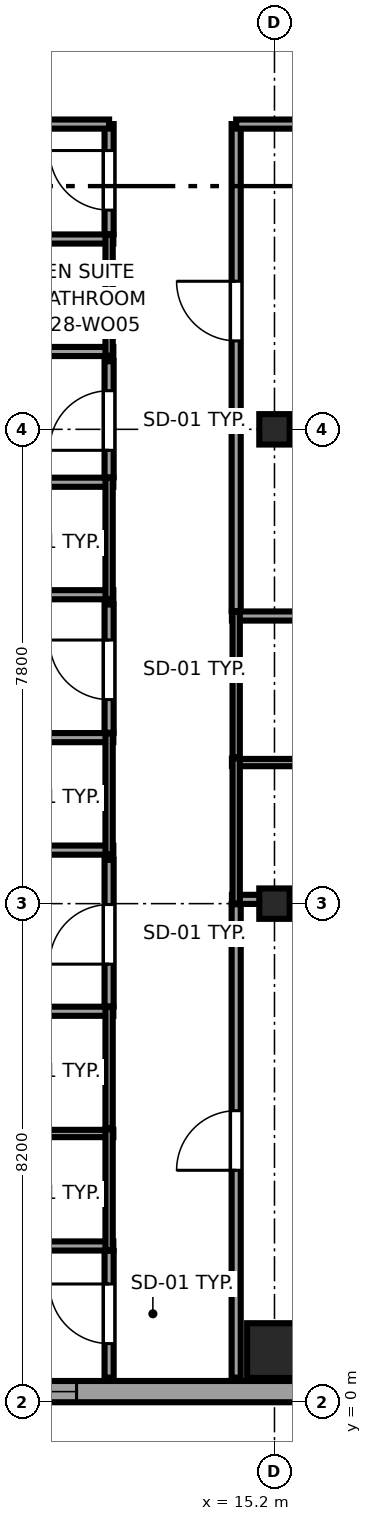
"""IFC4 building model, lengths in metres.
Left out: names, types, materials, properties, quantities, classifications, styles, units other than length and angle.
Written with IfcOpenShell. Run it as: python <this file> out.ifc"""

import sys

from ifc_helpers import new_model, si_unit, direction, frame, frame_2d, origin, origin_2d, place, context, subcontext, project, spatial, rectangle, i_section, extrude, source, transform, mapped, element, fill, save


model = new_model("IFC4")
c1 = context("Model", 3, precision=1e-05, world=origin(), true_north=direction((0.0, 1.0)))
c2 = subcontext(c1, "Body", "Model", "MODEL_VIEW")
j1 = project(units=[si_unit("LENGTHUNIT", "METRE"), si_unit("PLANEANGLEUNIT", "RADIAN")], contexts=[c1])
p1 = place(None, origin())
s1 = spatial("IfcSite", under=j1, at=p1, CompositionType="ELEMENT")
p2 = place(p1, origin())
s2 = spatial("IfcBuilding", under=s1, at=p2, CompositionType="ELEMENT")
p3 = place(p2, frame((0.0, 0.0, 111.55)))
s3 = spatial("IfcBuildingStorey", under=s2, at=p3, CompositionType="ELEMENT", Elevation=111.55)
m1 = source(origin(), c2, "Body", "SweptSolid", [
    extrude(rectangle(XDim=0.9, YDim=0.9, at=origin_2d()), origin(), (0.0, 0.0, 1.0), 3.55),
])
p4 = place(p3, frame((15.2, 0.85, 0.0), z_axis=(0.0, 0.0, 1.0), x_axis=(1.0, 0.0, 0.0)))
e1 = element("IfcColumn", 1, at=p4, inside=s3, PredefinedType="COLUMN", context=c2, shape_type="MappedRepresentation", body=[
    mapped(m1, transform((0.0, 0.0, 0.0), x_axis=(1.0, 0.0, 0.0), y_axis=(0.0, 1.0, 0.0), z_axis=(0.0, 0.0, 1.0), scale=1.0)),
])
m2 = source(origin(), c2, "Body", "SweptSolid", [
    extrude(i_section(OverallWidth=0.5, OverallDepth=0.5, WebThickness=0.022, FlangeThickness=0.034, at=origin_2d()), origin(), (0.0, 0.0, 1.0), 3.55),
])
for number, where, z_axis, x_axis in (
    (2, (15.2, 8.2, 0.0), (0.0, 0.0, 1.0), (1.0, 0.0, 0.0)),
    (3, (15.2, 16.0, 0.0), (0.0, 0.0, 1.0), (1.0, 0.0, 0.0)),
):
    element("IfcColumn", number, at=place(p3, frame(where, z_axis=z_axis, x_axis=x_axis)), inside=s3, PredefinedType="COLUMN", context=c2, shape_type="MappedRepresentation", body=[
        mapped(m2, transform((0.0, 0.0, 0.0), x_axis=(1.0, 0.0, 0.0), y_axis=(0.0, 1.0, 0.0), z_axis=(0.0, 0.0, 1.0), scale=1.0)),
    ])
p5 = place(p3, frame((4.617, 0.175, 0.0), z_axis=(0.0, 0.0, 1.0), x_axis=(1.0, 0.0, 0.0)))
e4 = element("IfcWall", 4, at=p5, inside=s3, PredefinedType="SOLIDWALL", context=c2, shape_type="SweptSolid", body=[
    extrude(rectangle(XDim=18.008, YDim=0.35, at=frame_2d((9.004, 0.0))), origin(), (0.0, 0.0, 1.0), 3.37),
])
p6 = place(p5, frame((5.378, 0.0, 0.68)))
e5 = element("IfcOpeningElement", 5, at=p6, cuts=e4, PredefinedType="OPENING", context=c2, shape_type="SweptSolid", body=[
    extrude(rectangle(XDim=1.95, YDim=1.82, at=frame_2d((0.975, 0.91))), frame((0.0, 0.185, 0.0), z_axis=(0.0, -1.0, 0.0), x_axis=(1.0, 0.0, 0.0)), (0.0, 0.0, 1.0), 0.37),
])
p7 = place(p5, frame((14.332, 0.0, 0.68)))
e6 = element("IfcOpeningElement", 6, at=p7, cuts=e4, PredefinedType="OPENING", context=c2, shape_type="SweptSolid", body=[
    extrude(rectangle(XDim=1.95, YDim=1.82, at=frame_2d((0.975, 0.91))), frame((0.0, 0.185, 0.0), z_axis=(0.0, -1.0, 0.0), x_axis=(1.0, 0.0, 0.0)), (0.0, 0.0, 1.0), 0.37),
])
p8 = place(p3, frame((9.96, 2.57, 0.0), z_axis=(0.0, 0.0, 1.0), x_axis=(1.0, 0.0, 0.0)))
e7 = element("IfcWall", 7, at=p8, inside=s3, PredefinedType="PARTITIONING", context=c2, shape_type="SweptSolid", body=[
    extrude(rectangle(XDim=2.59, YDim=0.15, at=frame_2d((1.295, 0.0))), origin(), (0.0, 0.0, 1.0), 3.37),
])
p9 = place(p3, frame((9.96, 4.42, 0.0), z_axis=(0.0, 0.0, 1.0), x_axis=(1.0, 0.0, 0.0)))
e8 = element("IfcWall", 8, at=p9, inside=s3, PredefinedType="PLUMBINGWALL", context=c2, shape_type="SweptSolid", body=[
    extrude(rectangle(XDim=2.59, YDim=0.12, at=frame_2d((1.295, 0.0))), origin(), (0.0, 0.0, 1.0), 3.37),
])
p10 = place(p3, frame((12.48, 2.5, 0.0), z_axis=(0.0, 0.0, 1.0), x_axis=(0.0, 1.0, 0.0)))
e9 = element("IfcWall", 9, at=p10, inside=s3, PredefinedType="PLUMBINGWALL", context=c2, shape_type="SweptSolid", body=[
    extrude(rectangle(XDim=1.99, YDim=0.12, at=frame_2d((0.995, 0.0))), origin(), (0.0, 0.0, 1.0), 3.37),
])
p11 = place(p3, frame((9.96, 6.43, 0.0), z_axis=(0.0, 0.0, 1.0), x_axis=(1.0, 0.0, 0.0)))
e10 = element("IfcWall", 10, at=p11, inside=s3, PredefinedType="PARTITIONING", context=c2, shape_type="SweptSolid", body=[
    extrude(rectangle(XDim=2.59, YDim=0.15, at=frame_2d((1.295, 0.0))), origin(), (0.0, 0.0, 1.0), 3.37),
])
p12 = place(p3, frame((12.48, 4.51, 0.0), z_axis=(0.0, 0.0, 1.0), x_axis=(0.0, 1.0, 0.0)))
e11 = element("IfcWall", 11, at=p12, inside=s3, PredefinedType="PLUMBINGWALL", context=c2, shape_type="SweptSolid", body=[
    extrude(rectangle(XDim=1.99, YDim=0.12, at=frame_2d((0.995, 0.0))), origin(), (0.0, 0.0, 1.0), 3.37),
])
p13 = place(p3, frame((0.405, 9.08, 0.0), z_axis=(0.0, 0.0, 1.0), x_axis=(1.0, 0.0, 0.0)))
e12 = element("IfcWall", 12, at=p13, inside=s3, PredefinedType="PARTITIONING", context=c2, shape_type="SweptSolid", body=[
    extrude(rectangle(XDim=12.145, YDim=0.15, at=frame_2d((6.073, 0.0))), origin(), (0.0, 0.0, 1.0), 3.37),
])
p14 = place(p3, frame((9.96, 10.93, 0.0), z_axis=(0.0, 0.0, 1.0), x_axis=(1.0, 0.0, 0.0)))
e13 = element("IfcWall", 13, at=p14, inside=s3, PredefinedType="PARTITIONING", context=c2, shape_type="SweptSolid", body=[
    extrude(rectangle(XDim=2.59, YDim=0.15, at=frame_2d((1.295, 0.0))), origin(), (0.0, 0.0, 1.0), 3.37),
])
p15 = place(p3, frame((12.48, 9.01, 0.0), z_axis=(0.0, 0.0, 1.0), x_axis=(0.0, 1.0, 0.0)))
e14 = element("IfcWall", 14, at=p15, inside=s3, PredefinedType="PLUMBINGWALL", context=c2, shape_type="SweptSolid", body=[
    extrude(rectangle(XDim=1.99, YDim=0.12, at=frame_2d((0.995, 0.0))), origin(), (0.0, 0.0, 1.0), 3.37),
])
p16 = place(p3, frame((0.405, 13.28, 0.0), z_axis=(0.0, 0.0, 1.0), x_axis=(1.0, 0.0, 0.0)))
e15 = element("IfcWall", 15, at=p16, inside=s3, PredefinedType="PARTITIONING", context=c2, shape_type="SweptSolid", body=[
    extrude(rectangle(XDim=12.145, YDim=0.15, at=frame_2d((6.073, 0.0))), origin(), (0.0, 0.0, 1.0), 3.37),
])
p17 = place(p3, frame((9.96, 15.13, 0.0), z_axis=(0.0, 0.0, 1.0), x_axis=(1.0, 0.0, 0.0)))
e16 = element("IfcWall", 16, at=p17, inside=s3, PredefinedType="PARTITIONING", context=c2, shape_type="SweptSolid", body=[
    extrude(rectangle(XDim=2.59, YDim=0.15, at=frame_2d((1.295, 0.0))), origin(), (0.0, 0.0, 1.0), 3.37),
])
p18 = place(p3, frame((12.48, 13.21, 0.0), z_axis=(0.0, 0.0, 1.0), x_axis=(0.0, 1.0, 0.0)))
e17 = element("IfcWall", 17, at=p18, inside=s3, PredefinedType="PLUMBINGWALL", context=c2, shape_type="SweptSolid", body=[
    extrude(rectangle(XDim=1.99, YDim=0.12, at=frame_2d((0.995, 0.0))), origin(), (0.0, 0.0, 1.0), 3.37),
])
p19 = place(p3, frame((0.405, 17.28, 0.0), z_axis=(0.0, 0.0, 1.0), x_axis=(1.0, 0.0, 0.0)))
e18 = element("IfcWall", 18, at=p19, inside=s3, PredefinedType="PARTITIONING", context=c2, shape_type="SweptSolid", body=[
    extrude(rectangle(XDim=12.145, YDim=0.15, at=frame_2d((6.073, 0.0))), origin(), (0.0, 0.0, 1.0), 3.37),
])
p20 = place(p3, frame((9.96, 19.13, 0.0), z_axis=(0.0, 0.0, 1.0), x_axis=(1.0, 0.0, 0.0)))
e19 = element("IfcWall", 19, at=p20, inside=s3, PredefinedType="PARTITIONING", context=c2, shape_type="SweptSolid", body=[
    extrude(rectangle(XDim=2.59, YDim=0.15, at=frame_2d((1.295, 0.0))), origin(), (0.0, 0.0, 1.0), 3.37),
])
p21 = place(p3, frame((12.48, 17.21, 0.0), z_axis=(0.0, 0.0, 1.0), x_axis=(0.0, 1.0, 0.0)))
e20 = element("IfcWall", 20, at=p21, inside=s3, PredefinedType="PLUMBINGWALL", context=c2, shape_type="SweptSolid", body=[
    extrude(rectangle(XDim=1.99, YDim=0.12, at=frame_2d((0.995, 0.0))), origin(), (0.0, 0.0, 1.0), 3.37),
])
p22 = place(p3, frame((14.5, 8.27, 0.0), z_axis=(0.0, 0.0, 1.0), x_axis=(1.0, 0.0, 0.0)))
e21 = element("IfcWall", 21, at=p22, inside=s3, PredefinedType="PARTITIONING", context=c2, shape_type="SweptSolid", body=[
    extrude(rectangle(XDim=2.59, YDim=0.15, at=frame_2d((1.295, 0.0))), origin(), (0.0, 0.0, 1.0), 2.748),
])
p23 = place(p3, frame((14.5, 10.52, 0.0), z_axis=(0.0, 0.0, 1.0), x_axis=(1.0, 0.0, 0.0)))
e22 = element("IfcWall", 22, at=p23, inside=s3, PredefinedType="PLUMBINGWALL", context=c2, shape_type="SweptSolid", body=[
    extrude(rectangle(XDim=2.59, YDim=0.12, at=frame_2d((1.295, 0.0))), origin(), (0.0, 0.0, 1.0), 3.37),
])
p24 = place(p3, frame((14.57, 8.2, 0.0), z_axis=(0.0, 0.0, 1.0), x_axis=(0.0, 1.0, 0.0)))
e23 = element("IfcWall", 23, at=p24, inside=s3, PredefinedType="PLUMBINGWALL", context=c2, shape_type="SweptSolid", body=[
    extrude(rectangle(XDim=2.39, YDim=0.12, at=frame_2d((1.195, 0.0))), origin(), (0.0, 0.0, 1.0), 3.37),
])
p25 = place(p3, frame((14.5, 12.93, 0.0), z_axis=(0.0, 0.0, 1.0), x_axis=(1.0, 0.0, 0.0)))
e24 = element("IfcWall", 24, at=p25, inside=s3, PredefinedType="PARTITIONING", context=c2, shape_type="SweptSolid", body=[
    extrude(rectangle(XDim=2.59, YDim=0.15, at=frame_2d((1.295, 0.0))), origin(), (0.0, 0.0, 1.0), 3.37),
])
p26 = place(p3, frame((14.57, 10.61, 0.0), z_axis=(0.0, 0.0, 1.0), x_axis=(0.0, 1.0, 0.0)))
e25 = element("IfcWall", 25, at=p26, inside=s3, PredefinedType="PLUMBINGWALL", context=c2, shape_type="SweptSolid", body=[
    extrude(rectangle(XDim=2.39, YDim=0.12, at=frame_2d((1.195, 0.0))), origin(), (0.0, 0.0, 1.0), 3.37),
])
p27 = place(p3, frame((12.48, 0.405, 0.0), z_axis=(0.0, 0.0, 1.0), x_axis=(0.0, 1.0, 0.0)))
e26 = element("IfcWall", 26, at=p27, inside=s3, PredefinedType="PARTITIONING", context=c2, shape_type="SweptSolid", body=[
    extrude(rectangle(XDim=2.085, YDim=0.15, at=frame_2d((1.042, 0.0))), origin(), (0.0, 0.0, 1.0), 3.37),
])
p28 = place(p27, frame((0.56, 0.0, 0.0)))
e27 = element("IfcOpeningElement", 27, at=p28, cuts=e26, PredefinedType="OPENING", context=c2, shape_type="SweptSolid", body=[
    extrude(rectangle(XDim=0.98, YDim=2.12, at=frame_2d((0.49, 1.06))), frame((0.0, 0.085, 0.0), z_axis=(0.0, -1.0, 0.0), x_axis=(1.0, 0.0, 0.0)), (0.0, 0.0, 1.0), 0.17),
])
p29 = place(p3, frame((12.48, 6.51, 0.0), z_axis=(0.0, 0.0, 1.0), x_axis=(0.0, 1.0, 0.0)))
e28 = element("IfcWall", 28, at=p29, inside=s3, PredefinedType="PARTITIONING", context=c2, shape_type="SweptSolid", body=[
    extrude(rectangle(XDim=2.41, YDim=0.15, at=frame_2d((1.205, 0.0))), origin(), (0.0, 0.0, 1.0), 3.37),
])
p30 = place(p29, frame((0.695, 0.0, 0.0)))
e29 = element("IfcOpeningElement", 29, at=p30, cuts=e28, PredefinedType="OPENING", context=c2, shape_type="SweptSolid", body=[
    extrude(rectangle(XDim=0.98, YDim=2.12, at=frame_2d((0.49, 1.06))), frame((0.0, 0.085, 0.0), z_axis=(0.0, -1.0, 0.0), x_axis=(1.0, 0.0, 0.0)), (0.0, 0.0, 1.0), 0.17),
])
p31 = place(p3, frame((12.48, 11.01, 0.0), z_axis=(0.0, 0.0, 1.0), x_axis=(0.0, 1.0, 0.0)))
e30 = element("IfcWall", 30, at=p31, inside=s3, PredefinedType="PARTITIONING", context=c2, shape_type="SweptSolid", body=[
    extrude(rectangle(XDim=2.11, YDim=0.15, at=frame_2d((1.055, 0.0))), origin(), (0.0, 0.0, 1.0), 3.37),
])
p32 = place(p31, frame((0.545, 0.0, 0.0)))
e31 = element("IfcOpeningElement", 31, at=p32, cuts=e30, PredefinedType="OPENING", context=c2, shape_type="SweptSolid", body=[
    extrude(rectangle(XDim=0.98, YDim=2.12, at=frame_2d((0.49, 1.06))), frame((0.0, 0.085, 0.0), z_axis=(0.0, -1.0, 0.0), x_axis=(1.0, 0.0, 0.0)), (0.0, 0.0, 1.0), 0.17),
])
p33 = place(p3, frame((12.48, 15.21, 0.0), z_axis=(0.0, 0.0, 1.0), x_axis=(0.0, 1.0, 0.0)))
e32 = element("IfcWall", 32, at=p33, inside=s3, PredefinedType="PARTITIONING", context=c2, shape_type="SweptSolid", body=[
    extrude(rectangle(XDim=1.91, YDim=0.15, at=frame_2d((0.955, 0.0))), origin(), (0.0, 0.0, 1.0), 3.37),
])
p34 = place(p33, frame((0.445, 0.0, 0.0)))
e33 = element("IfcOpeningElement", 33, at=p34, cuts=e32, PredefinedType="OPENING", context=c2, shape_type="SweptSolid", body=[
    extrude(rectangle(XDim=0.98, YDim=2.12, at=frame_2d((0.49, 1.06))), frame((0.0, 0.085, 0.0), z_axis=(0.0, -1.0, 0.0), x_axis=(1.0, 0.0, 0.0)), (0.0, 0.0, 1.0), 0.17),
])
p35 = place(p3, frame((12.48, 19.21, 0.0), z_axis=(0.0, 0.0, 1.0), x_axis=(0.0, 1.0, 0.0)))
e34 = element("IfcWall", 34, at=p35, inside=s3, PredefinedType="PARTITIONING", context=c2, shape_type="SweptSolid", body=[
    extrude(rectangle(XDim=1.81, YDim=0.15, at=frame_2d((0.905, 0.0))), origin(), (0.0, 0.0, 1.0), 3.37),
])
p36 = place(p35, frame((0.395, 0.0, 0.0)))
e35 = element("IfcOpeningElement", 35, at=p36, cuts=e34, PredefinedType="OPENING", context=c2, shape_type="SweptSolid", body=[
    extrude(rectangle(XDim=0.98, YDim=2.12, at=frame_2d((0.49, 1.06))), frame((0.0, 0.085, 0.0), z_axis=(0.0, -1.0, 0.0), x_axis=(1.0, 0.0, 0.0)), (0.0, 0.0, 1.0), 0.17),
])
p37 = place(p3, frame((0.405, 21.02, 0.0), z_axis=(0.0, 0.0, 1.0), x_axis=(1.0, 0.0, 0.0)))
e36 = element("IfcWall", 36, at=p37, inside=s3, PredefinedType="PARTITIONING", context=c2, shape_type="SweptSolid", body=[
    extrude(rectangle(XDim=12.075, YDim=0.15, at=frame_2d((6.038, 0.0))), origin(), (0.0, 0.0, 1.0), 3.37),
])
p38 = place(p3, frame((14.57, 0.405, 0.0), z_axis=(0.0, 0.0, 1.0), x_axis=(0.0, 1.0, 0.0)))
e37 = element("IfcWall", 37, at=p38, inside=s3, PredefinedType="PARTITIONING", context=c2, shape_type="SweptSolid", body=[
    extrude(rectangle(XDim=7.785, YDim=0.15, at=frame_2d((3.893, 0.0))), origin(), (0.0, 0.0, 1.0), 3.37),
])
p39 = place(p38, frame((3.41, 0.0, 0.0)))
e38 = element("IfcOpeningElement", 38, at=p39, cuts=e37, PredefinedType="OPENING", context=c2, shape_type="SweptSolid", body=[
    extrude(rectangle(XDim=0.98, YDim=2.12, at=frame_2d((0.49, 1.06))), frame((0.0, 0.085, 0.0), z_axis=(0.0, -1.0, 0.0), x_axis=(1.0, 0.0, 0.0)), (0.0, 0.0, 1.0), 0.17),
])
p40 = place(p3, frame((14.57, 13.01, 0.0), z_axis=(0.0, 0.0, 1.0), x_axis=(0.0, 1.0, 0.0)))
e39 = element("IfcWall", 39, at=p40, inside=s3, PredefinedType="PARTITIONING", context=c2, shape_type="SweptSolid", body=[
    extrude(rectangle(XDim=8.01, YDim=0.15, at=frame_2d((4.005, 0.0))), origin(), (0.0, 0.0, 1.0), 3.37),
])
p41 = place(p40, frame((4.445, 0.0, 0.0)))
e40 = element("IfcOpeningElement", 40, at=p41, cuts=e39, PredefinedType="OPENING", context=c2, shape_type="SweptSolid", body=[
    extrude(rectangle(XDim=0.98, YDim=2.12, at=frame_2d((0.49, 1.06))), frame((0.0, 0.085, 0.0), z_axis=(0.0, -1.0, 0.0), x_axis=(1.0, 0.0, 0.0)), (0.0, 0.0, 1.0), 0.17),
])
p42 = place(p3, frame((14.57, 21.02, 0.0), z_axis=(0.0, 0.0, 1.0), x_axis=(1.0, 0.0, 0.0)))
e41 = element("IfcWall", 41, at=p42, inside=s3, PredefinedType="PARTITIONING", context=c2, shape_type="SweptSolid", body=[
    extrude(rectangle(XDim=7.78, YDim=0.15, at=frame_2d((3.89, 0.0))), origin(), (0.0, 0.0, 1.0), 3.37),
])
m3 = source(origin(), c2, "Body", "SweptSolid", [
    extrude(rectangle(XDim=1.95, YDim=1.82, at=frame_2d((0.975, 0.91))), frame((0.0, 0.09, 0.0), z_axis=(0.0, -1.0, 0.0), x_axis=(1.0, 0.0, 0.0)), (0.0, 0.0, 1.0), 0.06),
])
p43 = place(p6, origin())
e42 = element("IfcWindow", 42, at=p43, inside=s3, PartitioningType="DOUBLE_PANEL_VERTICAL", PredefinedType="WINDOW", context=c2, shape_type="MappedRepresentation", body=[
    mapped(m3, transform((0.0, 0.0, 0.0), x_axis=(1.0, 0.0, 0.0), y_axis=(0.0, 1.0, 0.0), z_axis=(0.0, 0.0, 1.0), scale=1.0)),
])
fill(e5, e42)
m4 = source(origin(), c2, "Body", "SweptSolid", [
    extrude(rectangle(XDim=0.98, YDim=2.12, at=frame_2d((0.49, 1.06))), frame((0.0, 0.025, 0.0), z_axis=(0.0, -1.0, 0.0), x_axis=(1.0, 0.0, 0.0)), (0.0, 0.0, 1.0), 0.05),
])
p44 = place(p28, origin())
e43 = element("IfcDoor", 43, at=p44, inside=s3, OperationType="SINGLE_SWING_RIGHT", PredefinedType="DOOR", context=c2, shape_type="MappedRepresentation", body=[
    mapped(m4, transform((0.0, 0.0, 0.0), x_axis=(1.0, 0.0, 0.0), y_axis=(0.0, 1.0, 0.0), z_axis=(0.0, 0.0, 1.0), scale=1.0)),
])
fill(e27, e43)
p45 = place(p30, origin())
e44 = element("IfcDoor", 44, at=p45, inside=s3, OperationType="SINGLE_SWING_LEFT", PredefinedType="DOOR", context=c2, shape_type="MappedRepresentation", body=[
    mapped(m4, transform((0.0, 0.0, 0.0), x_axis=(1.0, 0.0, 0.0), y_axis=(0.0, 1.0, 0.0), z_axis=(0.0, 0.0, 1.0), scale=1.0)),
])
fill(e29, e44)
p46 = place(p32, origin())
e45 = element("IfcDoor", 45, at=p46, inside=s3, OperationType="SINGLE_SWING_RIGHT", PredefinedType="DOOR", context=c2, shape_type="MappedRepresentation", body=[
    mapped(m4, transform((0.0, 0.0, 0.0), x_axis=(1.0, 0.0, 0.0), y_axis=(0.0, 1.0, 0.0), z_axis=(0.0, 0.0, 1.0), scale=1.0)),
])
fill(e31, e45)
p47 = place(p34, origin())
e46 = element("IfcDoor", 46, at=p47, inside=s3, OperationType="SINGLE_SWING_LEFT", PredefinedType="DOOR", context=c2, shape_type="MappedRepresentation", body=[
    mapped(m4, transform((0.0, 0.0, 0.0), x_axis=(1.0, 0.0, 0.0), y_axis=(0.0, 1.0, 0.0), z_axis=(0.0, 0.0, 1.0), scale=1.0)),
])
fill(e33, e46)
p48 = place(p36, origin())
e47 = element("IfcDoor", 47, at=p48, inside=s3, OperationType="SINGLE_SWING_RIGHT", PredefinedType="DOOR", context=c2, shape_type="MappedRepresentation", body=[
    mapped(m4, transform((0.0, 0.0, 0.0), x_axis=(1.0, 0.0, 0.0), y_axis=(0.0, 1.0, 0.0), z_axis=(0.0, 0.0, 1.0), scale=1.0)),
])
fill(e35, e47)
p49 = place(p39, origin())
e48 = element("IfcDoor", 48, at=p49, inside=s3, OperationType="SINGLE_SWING_LEFT", PredefinedType="DOOR", context=c2, shape_type="MappedRepresentation", body=[
    mapped(m4, transform((0.0, 0.0, 0.0), x_axis=(1.0, 0.0, 0.0), y_axis=(0.0, 1.0, 0.0), z_axis=(0.0, 0.0, 1.0), scale=1.0)),
])
fill(e38, e48)
p50 = place(p41, origin())
e49 = element("IfcDoor", 49, at=p50, inside=s3, OperationType="SINGLE_SWING_RIGHT", PredefinedType="DOOR", context=c2, shape_type="MappedRepresentation", body=[
    mapped(m4, transform((0.0, 0.0, 0.0), x_axis=(1.0, 0.0, 0.0), y_axis=(0.0, 1.0, 0.0), z_axis=(0.0, 0.0, 1.0), scale=1.0)),
])
fill(e40, e49)
save(model, sys.argv[1])
